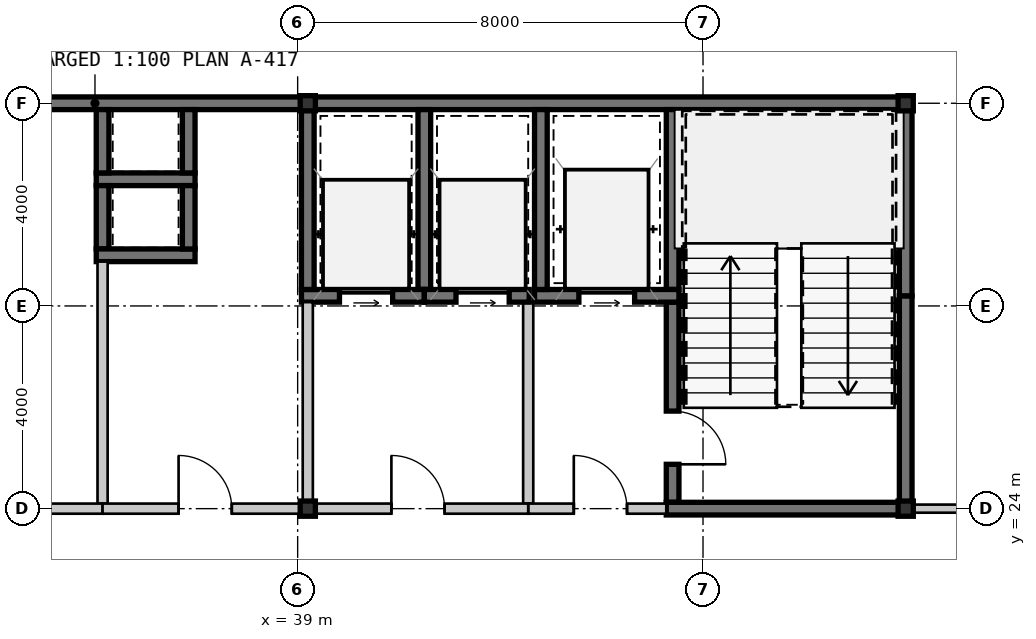
"""IFC4 building model, lengths in metres.
Left out: names, types, materials, properties, quantities, classifications, styles, units other than length and angle.
Written with IfcOpenShell. Run it as: python <this file> out.ifc"""

import sys

from ifc_helpers import new_model, si_unit, direction, frame, frame_2d, origin, origin_2d, place, context, subcontext, project, spatial, rectangle, hollow_rectangle, extrude, source, transform, mapped, element, fill, save


model = new_model("IFC4")
c1 = context("Model", 3, precision=1e-05, world=origin(), true_north=direction((0.0, 1.0)))
c2 = subcontext(c1, "Body", "Model", "MODEL_VIEW")
j1 = project(units=[si_unit("LENGTHUNIT", "METRE"), si_unit("PLANEANGLEUNIT", "RADIAN")], contexts=[c1])
p1 = place(None, origin())
s1 = spatial("IfcSite", under=j1, at=p1, CompositionType="ELEMENT")
p2 = place(p1, origin())
s2 = spatial("IfcBuilding", under=s1, at=p2, CompositionType="ELEMENT")
p3 = place(p2, frame((0.0, 0.0, 249.2)))
s3 = spatial("IfcBuildingStorey", under=s2, at=p3, CompositionType="ELEMENT", Elevation=249.2)
m1 = source(origin(), c2, "Body", "SweptSolid", [
    extrude(hollow_rectangle(XDim=0.3, YDim=0.3, WallThickness=0.012, at=origin_2d()), origin(), (0.0, 0.0, 1.0), 3.85),
])
for number, where, z_axis, x_axis in (
    (1, (39.2, 24.0, 0.0), (0.0, 0.0, 1.0), (1.0, 0.0, 0.0)),
    (2, (51.0, 24.0, 0.0), (0.0, 0.0, 1.0), (1.0, 0.0, 0.0)),
    (3, (39.2, 32.0, 0.0), (0.0, 0.0, 1.0), (1.0, 0.0, 0.0)),
    (4, (51.0, 32.0, 0.0), (0.0, 0.0, 1.0), (1.0, 0.0, 0.0)),
):
    element("IfcColumn", number, at=place(p3, frame(where, z_axis=z_axis, x_axis=x_axis)), inside=s3, PredefinedType="COLUMN", context=c2, shape_type="MappedRepresentation", body=[
        mapped(m1, transform((0.0, 0.0, 0.0), scale=1.0)),
    ])
m2 = source(origin(), c2, "Body", "SweptSolid", [
    extrude(rectangle(XDim=11.2, YDim=0.25, at=frame_2d((5.6, 0.0))), origin(), (0.0, 0.0, 1.0), 3.57),
])
p4 = place(p3, frame((28.0, 32.0, 0.0), z_axis=(0.0, 0.0, 1.0), x_axis=(1.0, 0.0, 0.0)))
e5 = element("IfcWall", 5, at=p4, inside=s3, PredefinedType="SHEAR", context=c2, shape_type="MappedRepresentation", body=[
    mapped(m2, transform((0.0, 0.0, 0.0), scale=1.0)),
])
m3 = source(origin(), c2, "Body", "SweptSolid", [
    extrude(rectangle(XDim=11.925, YDim=0.25, at=frame_2d((5.962, 0.0))), origin(), (0.0, 0.0, 1.0), 3.57),
])
p5 = place(p3, frame((39.2, 32.0, 0.0), z_axis=(0.0, 0.0, 1.0), x_axis=(1.0, 0.0, 0.0)))
e6 = element("IfcWall", 6, at=p5, inside=s3, PredefinedType="SHEAR", context=c2, shape_type="MappedRepresentation", body=[
    mapped(m3, transform((0.0, 0.0, 0.0), scale=1.0)),
])
m4 = source(origin(), c2, "Body", "SweptSolid", [
    extrude(rectangle(XDim=4.075, YDim=0.25, at=frame_2d((2.038, 0.0))), origin(), (0.0, 0.0, 1.0), 3.57),
])
p6 = place(p3, frame((51.0, 24.125, 0.0), z_axis=(0.0, 0.0, 1.0), x_axis=(0.0, 1.0, 0.0)))
e7 = element("IfcWall", 7, at=p6, inside=s3, PredefinedType="SHEAR", context=c2, shape_type="MappedRepresentation", body=[
    mapped(m4, transform((0.0, 0.0, 0.0), scale=1.0)),
])
m5 = source(origin(), c2, "Body", "SweptSolid", [
    extrude(rectangle(XDim=3.675, YDim=0.25, at=frame_2d((1.837, 0.0))), origin(), (0.0, 0.0, 1.0), 3.57),
])
p7 = place(p3, frame((51.0, 28.2, 0.0), z_axis=(0.0, 0.0, 1.0), x_axis=(0.0, 1.0, 0.0)))
e8 = element("IfcWall", 8, at=p7, inside=s3, PredefinedType="SHEAR", context=c2, shape_type="MappedRepresentation", body=[
    mapped(m5, transform((0.0, 0.0, 0.0), scale=1.0)),
])
m6 = source(origin(), c2, "Body", "SweptSolid", [
    extrude(rectangle(XDim=3.55, YDim=0.25, at=frame_2d((1.775, 0.0))), origin(), (0.0, 0.0, 1.0), 3.57),
])
p8 = place(p3, frame((46.4, 31.875, 0.0), z_axis=(0.0, 0.0, 1.0), x_axis=(0.0, -1.0, 0.0)))
e9 = element("IfcWall", 9, at=p8, inside=s3, PredefinedType="SHEAR", context=c2, shape_type="MappedRepresentation", body=[
    mapped(m6, transform((0.0, 0.0, 0.0), scale=1.0)),
])
m7 = source(origin(), c2, "Body", "SweptSolid", [
    extrude(rectangle(XDim=3.95, YDim=0.25, at=frame_2d((1.975, 0.0))), origin(), (0.0, 0.0, 1.0), 3.57),
])
p9 = place(p3, frame((46.4, 28.075, 0.0), z_axis=(0.0, 0.0, 1.0), x_axis=(0.0, -1.0, 0.0)))
e10 = element("IfcWall", 10, at=p9, inside=s3, PredefinedType="SHEAR", context=c2, shape_type="MappedRepresentation", body=[
    mapped(m7, transform((0.0, 0.0, 0.0), scale=1.0)),
])
m8 = source(origin(), c2, "Body", "SweptSolid", [
    extrude(rectangle(XDim=1.05, YDim=2.1, at=frame_2d((0.525, 1.05))), frame((0.0, 0.135, 0.0), z_axis=(0.0, -1.0, 0.0), x_axis=(1.0, 0.0, 0.0)), (0.0, 0.0, 1.0), 0.27),
])
p10 = place(p9, frame((2.15, 0.0, 0.0)))
e11 = element("IfcOpeningElement", 11, at=p10, cuts=e10, PredefinedType="OPENING", context=c2, shape_type="MappedRepresentation", body=[
    mapped(m8, transform((0.0, 0.0, 0.0), scale=1.0)),
])
m9 = source(origin(), c2, "Body", "SweptSolid", [
    extrude(rectangle(XDim=4.85, YDim=0.25, at=frame_2d((2.425, 0.0))), origin(), (0.0, 0.0, 1.0), 3.57),
])
p11 = place(p3, frame((46.275, 24.0, 0.0), z_axis=(0.0, 0.0, 1.0), x_axis=(1.0, 0.0, 0.0)))
e12 = element("IfcWall", 12, at=p11, inside=s3, PredefinedType="SHEAR", context=c2, shape_type="MappedRepresentation", body=[
    mapped(m9, transform((0.0, 0.0, 0.0), scale=1.0)),
])
m10 = source(origin(), c2, "Body", "SweptSolid", [
    extrude(rectangle(XDim=2.85, YDim=0.25, at=frame_2d((1.425, 0.0))), origin(), (0.0, 0.0, 1.0), 3.57),
])
p12 = place(p3, frame((43.675, 28.2, 0.0), z_axis=(0.0, 0.0, 1.0), x_axis=(1.0, 0.0, 0.0)))
e13 = element("IfcWall", 13, at=p12, inside=s3, PredefinedType="SHEAR", context=c2, shape_type="MappedRepresentation", body=[
    mapped(m10, transform((0.0, 0.0, 0.0), scale=1.0)),
])
m11 = source(origin(), c2, "Body", "SweptSolid", [
    extrude(rectangle(XDim=1.1, YDim=2.15, at=frame_2d((0.55, 1.075))), frame((0.0, 0.135, 0.0), z_axis=(0.0, -1.0, 0.0), x_axis=(1.0, 0.0, 0.0)), (0.0, 0.0, 1.0), 0.27),
])
p13 = place(p12, frame((0.875, 0.0, 0.0)))
e14 = element("IfcOpeningElement", 14, at=p13, cuts=e13, PredefinedType="OPENING", context=c2, shape_type="MappedRepresentation", body=[
    mapped(m11, transform((0.0, 0.0, 0.0), scale=1.0)),
])
p14 = place(p3, frame((43.8, 31.875, 0.0), z_axis=(0.0, 0.0, 1.0), x_axis=(0.0, -1.0, 0.0)))
e15 = element("IfcWall", 15, at=p14, inside=s3, PredefinedType="SHEAR", context=c2, shape_type="MappedRepresentation", body=[
    mapped(m6, transform((0.0, 0.0, 0.0), scale=1.0)),
])
m12 = source(origin(), c2, "Body", "SweptSolid", [
    extrude(rectangle(XDim=3.975, YDim=0.2, at=frame_2d((1.987, 0.0))), origin(), (0.0, 0.0, 1.0), 3.57),
])
p15 = place(p3, frame((43.55, 28.075, 0.0), z_axis=(0.0, 0.0, 1.0), x_axis=(0.0, -1.0, 0.0)))
e16 = element("IfcWall", 16, at=p15, inside=s3, PredefinedType="SOLIDWALL", context=c2, shape_type="MappedRepresentation", body=[
    mapped(m12, transform((0.0, 0.0, 0.0), scale=1.0)),
])
m13 = source(origin(), c2, "Body", "SweptSolid", [
    extrude(rectangle(XDim=2.725, YDim=0.2, at=frame_2d((1.362, 0.0))), origin(), (0.0, 0.0, 1.0), 3.037),
])
p16 = place(p3, frame((43.55, 24.0, 0.0), z_axis=(0.0, 0.0, 1.0), x_axis=(1.0, 0.0, 0.0)))
e17 = element("IfcWall", 17, at=p16, inside=s3, PredefinedType="SOLIDWALL", context=c2, shape_type="MappedRepresentation", body=[
    mapped(m13, transform((0.0, 0.0, 0.0), scale=1.0)),
])
m14 = source(origin(), c2, "Body", "SweptSolid", [
    extrude(rectangle(XDim=1.05, YDim=2.1, at=frame_2d((0.525, 1.05))), frame((0.0, 0.11, 0.0), z_axis=(0.0, -1.0, 0.0), x_axis=(1.0, 0.0, 0.0)), (0.0, 0.0, 1.0), 0.22),
])
p17 = place(p16, frame((0.9, 0.0, 0.0)))
e18 = element("IfcOpeningElement", 18, at=p17, cuts=e17, PredefinedType="OPENING", context=c2, shape_type="MappedRepresentation", body=[
    mapped(m14, transform((0.0, 0.0, 0.0), scale=1.0)),
])
m15 = source(origin(), c2, "Body", "SweptSolid", [
    extrude(rectangle(XDim=1.95, YDim=0.25, at=frame_2d((0.975, 0.0))), origin(), (0.0, 0.0, 1.0), 3.57),
])
p18 = place(p3, frame((35.025, 30.5, 0.0), z_axis=(0.0, 0.0, 1.0), x_axis=(1.0, 0.0, 0.0)))
e19 = element("IfcWall", 19, at=p18, inside=s3, PredefinedType="SHEAR", context=c2, shape_type="MappedRepresentation", body=[
    mapped(m15, transform((0.0, 0.0, 0.0), scale=1.0)),
])
m16 = source(origin(), c2, "Body", "SweptSolid", [
    extrude(rectangle(XDim=1.25, YDim=0.25, at=frame_2d((0.625, 0.0))), origin(), (0.0, 0.0, 1.0), 3.57),
])
for number, where, z_axis, x_axis in (
    (20, (35.15, 31.875, 0.0), (0.0, 0.0, 1.0), (0.0, -1.0, 0.0)),
    (21, (36.85, 30.625, 0.0), (0.0, 0.0, 1.0), (0.0, 1.0, 0.0)),
    (22, (35.15, 30.375, 0.0), (0.0, 0.0, 1.0), (0.0, -1.0, 0.0)),
):
    element("IfcWall", number, at=place(p3, frame(where, z_axis=z_axis, x_axis=x_axis)), inside=s3, PredefinedType="SHEAR", context=c2, shape_type="MappedRepresentation", body=[
        mapped(m16, transform((0.0, 0.0, 0.0), scale=1.0)),
    ])
p19 = place(p3, frame((35.025, 29.0, 0.0), z_axis=(0.0, 0.0, 1.0), x_axis=(1.0, 0.0, 0.0)))
e23 = element("IfcWall", 23, at=p19, inside=s3, PredefinedType="SHEAR", context=c2, shape_type="MappedRepresentation", body=[
    mapped(m15, transform((0.0, 0.0, 0.0), scale=1.0)),
])
p20 = place(p3, frame((36.85, 29.125, 0.0), z_axis=(0.0, 0.0, 1.0), x_axis=(0.0, 1.0, 0.0)))
e24 = element("IfcWall", 24, at=p20, inside=s3, PredefinedType="SHEAR", context=c2, shape_type="MappedRepresentation", body=[
    mapped(m16, transform((0.0, 0.0, 0.0), scale=1.0)),
])
p21 = place(p3, frame((41.5, 28.325, 0.0), z_axis=(0.0, 0.0, 1.0), x_axis=(0.0, 1.0, 0.0)))
e25 = element("IfcWall", 25, at=p21, inside=s3, PredefinedType="SHEAR", context=c2, shape_type="MappedRepresentation", body=[
    mapped(m6, transform((0.0, 0.0, 0.0), scale=1.0)),
])
m17 = source(origin(), c2, "Body", "SweptSolid", [
    extrude(rectangle(XDim=2.425, YDim=0.25, at=frame_2d((1.212, 0.0))), origin(), (0.0, 0.0, 1.0), 3.57),
])
p22 = place(p3, frame((39.075, 28.2, 0.0), z_axis=(0.0, 0.0, 1.0), x_axis=(1.0, 0.0, 0.0)))
e26 = element("IfcWall", 26, at=p22, inside=s3, PredefinedType="SHEAR", context=c2, shape_type="MappedRepresentation", body=[
    mapped(m17, transform((0.0, 0.0, 0.0), scale=1.0)),
])
m18 = source(origin(), c2, "Body", "SweptSolid", [
    extrude(rectangle(XDim=1.05, YDim=2.15, at=frame_2d((0.525, 1.075))), frame((0.0, 0.135, 0.0), z_axis=(0.0, -1.0, 0.0), x_axis=(1.0, 0.0, 0.0)), (0.0, 0.0, 1.0), 0.27),
])
p23 = place(p22, frame((0.75, 0.0, 0.0)))
e27 = element("IfcOpeningElement", 27, at=p23, cuts=e26, PredefinedType="OPENING", context=c2, shape_type="MappedRepresentation", body=[
    mapped(m18, transform((0.0, 0.0, 0.0), scale=1.0)),
])
p24 = place(p3, frame((39.2, 31.875, 0.0), z_axis=(0.0, 0.0, 1.0), x_axis=(0.0, -1.0, 0.0)))
e28 = element("IfcWall", 28, at=p24, inside=s3, PredefinedType="SHEAR", context=c2, shape_type="MappedRepresentation", body=[
    mapped(m6, transform((0.0, 0.0, 0.0), scale=1.0)),
])
m19 = source(origin(), c2, "Body", "SweptSolid", [
    extrude(rectangle(XDim=2.07, YDim=0.25, at=frame_2d((1.035, 0.0))), origin(), (0.0, 0.0, 1.0), 3.57),
])
p25 = place(p3, frame((41.5, 28.2, 0.0), z_axis=(0.0, 0.0, 1.0), x_axis=(1.0, 0.0, 0.0)))
e29 = element("IfcWall", 29, at=p25, inside=s3, PredefinedType="SHEAR", context=c2, shape_type="MappedRepresentation", body=[
    mapped(m19, transform((0.0, 0.0, 0.0), scale=1.0)),
])
p26 = place(p25, frame((0.625, 0.0, 0.0)))
e30 = element("IfcOpeningElement", 30, at=p26, cuts=e29, PredefinedType="OPENING", context=c2, shape_type="MappedRepresentation", body=[
    mapped(m18, transform((0.0, 0.0, 0.0), scale=1.0)),
])
m20 = source(origin(), c2, "Body", "SweptSolid", [
    extrude(rectangle(XDim=3.975, YDim=0.2, at=frame_2d((1.987, 0.0))), origin(), (0.0, 0.0, 1.0), 3.11),
])
p27 = place(p3, frame((39.2, 24.1, 0.0), z_axis=(0.0, 0.0, 1.0), x_axis=(0.0, 1.0, 0.0)))
e31 = element("IfcWall", 31, at=p27, inside=s3, PredefinedType="SOLIDWALL", context=c2, shape_type="MappedRepresentation", body=[
    mapped(m20, transform((0.0, 0.0, 0.0), scale=1.0)),
])
m21 = source(origin(), c2, "Body", "SweptSolid", [
    extrude(rectangle(XDim=4.35, YDim=0.2, at=frame_2d((2.175, 0.0))), origin(), (0.0, 0.0, 1.0), 3.037),
])
p28 = place(p3, frame((43.55, 24.0, 0.0), z_axis=(0.0, 0.0, 1.0), x_axis=(-1.0, 0.0, 0.0)))
e32 = element("IfcWall", 32, at=p28, inside=s3, PredefinedType="SOLIDWALL", context=c2, shape_type="MappedRepresentation", body=[
    mapped(m21, transform((0.0, 0.0, 0.0), scale=1.0)),
])
p29 = place(p28, frame((1.65, 0.0, 0.0)))
e33 = element("IfcOpeningElement", 33, at=p29, cuts=e32, PredefinedType="OPENING", context=c2, shape_type="MappedRepresentation", body=[
    mapped(m14, transform((0.0, 0.0, 0.0), scale=1.0)),
])
m22 = source(origin(), c2, "Body", "SweptSolid", [
    extrude(rectangle(XDim=4.775, YDim=0.2, at=frame_2d((2.387, 0.0))), origin(), (0.0, 0.0, 1.0), 3.57),
])
p30 = place(p3, frame((35.15, 28.875, 0.0), z_axis=(0.0, 0.0, 1.0), x_axis=(0.0, -1.0, 0.0)))
e34 = element("IfcWall", 34, at=p30, inside=s3, PredefinedType="SOLIDWALL", context=c2, shape_type="MappedRepresentation", body=[
    mapped(m22, transform((0.0, 0.0, 0.0), scale=1.0)),
])
m23 = source(origin(), c2, "Body", "SweptSolid", [
    extrude(rectangle(XDim=8.7, YDim=0.2, at=frame_2d((4.35, 0.0))), origin(), (0.0, 0.0, 1.0), 3.11),
])
p31 = place(p3, frame((35.15, 24.0, 0.0), z_axis=(0.0, 0.0, 1.0), x_axis=(-1.0, 0.0, 0.0)))
e35 = element("IfcWall", 35, at=p31, inside=s3, PredefinedType="SOLIDWALL", context=c2, shape_type="MappedRepresentation", body=[
    mapped(m23, transform((0.0, 0.0, 0.0), scale=1.0)),
])
p32 = place(p31, frame((3.825, 0.0, 0.0)))
e36 = element("IfcOpeningElement", 36, at=p32, cuts=e35, PredefinedType="OPENING", context=c2, shape_type="MappedRepresentation", body=[
    mapped(m14, transform((0.0, 0.0, 0.0), scale=1.0)),
])
m24 = source(origin(), c2, "Body", "SweptSolid", [
    extrude(rectangle(XDim=4.05, YDim=0.2, at=frame_2d((2.025, 0.0))), origin(), (0.0, 0.0, 1.0), 3.11),
])
p33 = place(p3, frame((39.2, 24.0, 0.0), z_axis=(0.0, 0.0, 1.0), x_axis=(-1.0, 0.0, 0.0)))
e37 = element("IfcWall", 37, at=p33, inside=s3, PredefinedType="SOLIDWALL", context=c2, shape_type="MappedRepresentation", body=[
    mapped(m24, transform((0.0, 0.0, 0.0), scale=1.0)),
])
p34 = place(p33, frame((1.5, 0.0, 0.0)))
e38 = element("IfcOpeningElement", 38, at=p34, cuts=e37, PredefinedType="OPENING", context=c2, shape_type="MappedRepresentation", body=[
    mapped(m14, transform((0.0, 0.0, 0.0), scale=1.0)),
])
m25 = source(origin(), c2, "Body", "SweptSolid", [
    extrude(rectangle(XDim=6.378, YDim=0.16, at=frame_2d((3.189, 0.0))), origin(), (0.0, 0.0, 1.0), 3.57),
])
p35 = place(p3, frame((51.125, 24.0, 0.0), z_axis=(0.0, 0.0, 1.0), x_axis=(1.0, 0.0, 0.0)))
e39 = element("IfcWall", 39, at=p35, inside=s3, PredefinedType="PARTITIONING", context=c2, shape_type="MappedRepresentation", body=[
    mapped(m25, transform((0.0, 0.0, 0.0), scale=1.0)),
])
m26 = source(origin(), c2, "Body", "SweptSolid", [
    extrude(rectangle(XDim=0.92, YDim=2.1, at=frame_2d((0.46, 1.05))), frame((0.0, 0.09, 0.0), z_axis=(0.0, -1.0, 0.0), x_axis=(1.0, 0.0, 0.0)), (0.0, 0.0, 1.0), 0.18),
])
p36 = place(p35, frame((2.677, 0.0, 0.0)))
e40 = element("IfcOpeningElement", 40, at=p36, cuts=e39, PredefinedType="OPENING", context=c2, shape_type="MappedRepresentation", body=[
    mapped(m26, transform((0.0, 0.0, 0.0), scale=1.0)),
])
m27 = source(origin(), c2, "Body", "SweptSolid", [
    extrude(rectangle(XDim=1.05, YDim=2.1, at=frame_2d((0.525, 1.05))), frame((0.0, 0.025, 0.0), z_axis=(0.0, -1.0, 0.0), x_axis=(1.0, 0.0, 0.0)), (0.0, 0.0, 1.0), 0.05),
])
p37 = place(p10, origin())
e41 = element("IfcDoor", 41, at=p37, inside=s3, OperationType="SINGLE_SWING_RIGHT", PredefinedType="DOOR", context=c2, shape_type="MappedRepresentation", body=[
    mapped(m27, transform((0.0, 0.0, 0.0), scale=1.0)),
])
fill(e11, e41)
m28 = source(origin(), c2, "Body", "SweptSolid", [
    extrude(rectangle(XDim=1.1, YDim=2.15, at=frame_2d((0.55, 1.075))), frame((0.0, 0.025, 0.0), z_axis=(0.0, -1.0, 0.0), x_axis=(1.0, 0.0, 0.0)), (0.0, 0.0, 1.0), 0.05),
])
p38 = place(p13, origin())
e42 = element("IfcDoor", 42, at=p38, inside=s3, OperationType="SLIDING_TO_LEFT", PredefinedType="DOOR", context=c2, shape_type="MappedRepresentation", body=[
    mapped(m28, transform((0.0, 0.0, 0.0), scale=1.0)),
])
fill(e14, e42)
p39 = place(p17, origin())
e43 = element("IfcDoor", 43, at=p39, inside=s3, OperationType="SINGLE_SWING_LEFT", PredefinedType="DOOR", context=c2, shape_type="MappedRepresentation", body=[
    mapped(m27, transform((0.0, 0.0, 0.0), scale=1.0)),
])
fill(e18, e43)
m29 = source(origin(), c2, "Body", "SweptSolid", [
    extrude(rectangle(XDim=1.05, YDim=2.15, at=frame_2d((0.525, 1.075))), frame((0.0, 0.025, 0.0), z_axis=(0.0, -1.0, 0.0), x_axis=(1.0, 0.0, 0.0)), (0.0, 0.0, 1.0), 0.05),
])
p40 = place(p23, origin())
e44 = element("IfcDoor", 44, at=p40, inside=s3, OperationType="SLIDING_TO_LEFT", PredefinedType="DOOR", context=c2, shape_type="MappedRepresentation", body=[
    mapped(m29, transform((0.0, 0.0, 0.0), scale=1.0)),
])
fill(e27, e44)
p41 = place(p26, origin())
e45 = element("IfcDoor", 45, at=p41, inside=s3, OperationType="SLIDING_TO_LEFT", PredefinedType="DOOR", context=c2, shape_type="MappedRepresentation", body=[
    mapped(m29, transform((0.0, 0.0, 0.0), scale=1.0)),
])
fill(e30, e45)
p42 = place(p29, frame((1.05, 0.0, 0.0), z_axis=(0.0, 0.0, 1.0), x_axis=(-1.0, 0.0, 0.0)))
e46 = element("IfcDoor", 46, at=p42, inside=s3, OperationType="SINGLE_SWING_LEFT", PredefinedType="DOOR", context=c2, shape_type="MappedRepresentation", body=[
    mapped(m27, transform((0.0, 0.0, 0.0), scale=1.0)),
])
fill(e33, e46)
p43 = place(p34, frame((1.05, 0.0, 0.0), z_axis=(0.0, 0.0, 1.0), x_axis=(-1.0, 0.0, 0.0)))
e47 = element("IfcDoor", 47, at=p43, inside=s3, OperationType="SINGLE_SWING_LEFT", PredefinedType="DOOR", context=c2, shape_type="MappedRepresentation", body=[
    mapped(m27, transform((0.0, 0.0, 0.0), scale=1.0)),
])
fill(e38, e47)
save(model, sys.argv[1])
